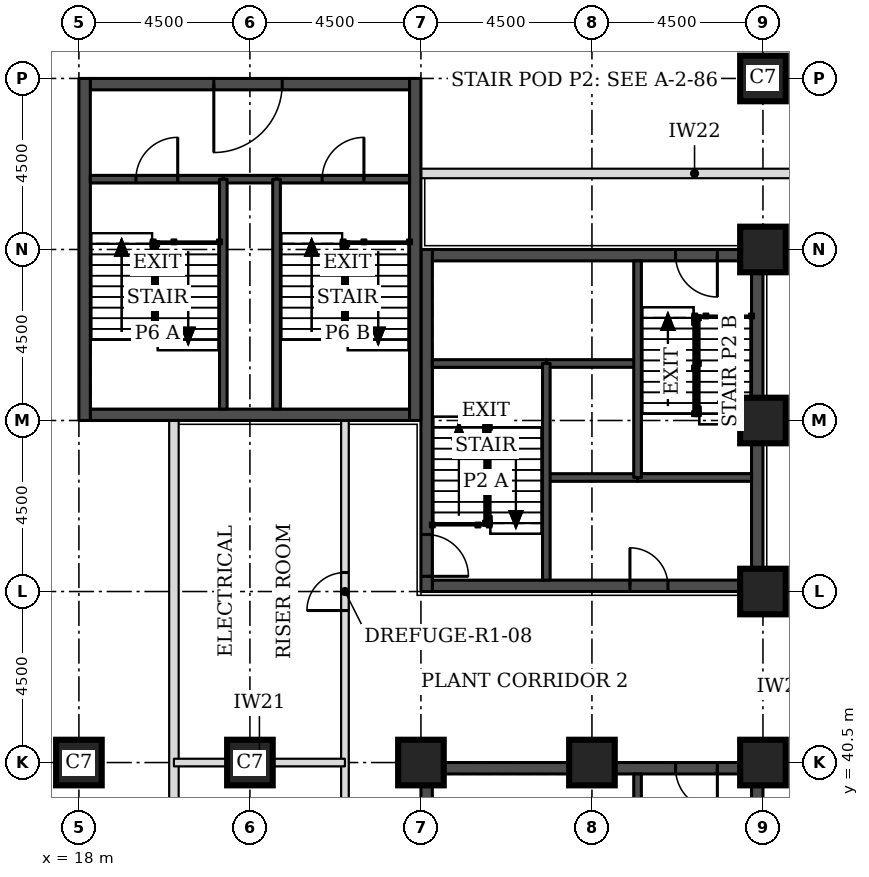
"""IFC4 building model, lengths in metres.
Left out: names, types, materials, properties, quantities, classifications, styles, units other than length and angle.
Written with IfcOpenShell. Run it as: python <this file> out.ifc"""

import sys

from ifc_helpers import new_model, si_unit, direction, frame, frame_2d, origin, origin_2d, place, context, subcontext, project, spatial, rectangle, extrude, element, fill, save


model = new_model("IFC4")
c1 = context("Model", 3, precision=1e-05, world=origin(), true_north=direction((0.0, 1.0)))
c2 = subcontext(c1, "Body", "Model", "MODEL_VIEW")
j1 = project(units=[si_unit("LENGTHUNIT", "METRE"), si_unit("PLANEANGLEUNIT", "RADIAN")], contexts=[c1])
p1 = place(None, origin())
s1 = spatial("IfcSite", under=j1, at=p1, CompositionType="ELEMENT")
p2 = place(p1, origin())
s2 = spatial("IfcBuilding", under=s1, at=p2, CompositionType="ELEMENT")
p3 = place(p2, frame((0.0, 0.0, 69.3)))
s3 = spatial("IfcBuildingStorey", under=s2, at=p3, CompositionType="ELEMENT", Elevation=69.3)
for number, where, z_axis, x_axis in (
    (1, (18.0, 40.5, 0.0), (0.0, 0.0, 1.0), (1.0, 0.0, 0.0)),
    (2, (22.5, 40.5, 0.0), (0.0, 0.0, 1.0), (1.0, 0.0, 0.0)),
    (3, (27.0, 40.5, 0.0), (0.0, 0.0, 1.0), (1.0, 0.0, 0.0)),
    (4, (31.5, 40.5, 0.0), (0.0, 0.0, 1.0), (1.0, 0.0, 0.0)),
    (5, (36.0, 40.5, 0.0), (0.0, 0.0, 1.0), (1.0, 0.0, 0.0)),
    (6, (36.0, 45.0, 0.0), (0.0, 0.0, 1.0), (1.0, 0.0, 0.0)),
    (7, (36.0, 49.5, 0.0), (0.0, 0.0, 1.0), (1.0, 0.0, 0.0)),
    (8, (36.0, 54.0, 0.0), (0.0, 0.0, 1.0), (1.0, 0.0, 0.0)),
    (9, (36.0, 58.5, 0.0), (0.0, 0.0, 1.0), (1.0, 0.0, 0.0)),
):
    element("IfcColumn", number, at=place(p3, frame(where, z_axis=z_axis, x_axis=x_axis)), inside=s3, PredefinedType="COLUMN", context=c2, shape_type="SweptSolid", body=[
        extrude(rectangle(XDim=1.2, YDim=1.2, at=origin_2d()), origin(), (0.0, 0.0, 1.0), 5.0),
    ])
p4 = place(p3, frame((27.3, 45.15, 0.0), z_axis=(0.0, 0.0, 1.0), x_axis=(1.0, 0.0, 0.0)))
e10 = element("IfcWall", 10, at=p4, inside=s3, PredefinedType="SHEAR", context=c2, shape_type="SweptSolid", body=[
    extrude(rectangle(XDim=8.4, YDim=0.3, at=frame_2d((4.2, 0.0))), origin(), (0.0, 0.0, 1.0), 5.0),
])
p5 = place(p4, frame((5.2, 0.0, 0.0)))
e11 = element("IfcOpeningElement", 11, at=p5, cuts=e10, PredefinedType="OPENING", context=c2, shape_type="SweptSolid", body=[
    extrude(rectangle(XDim=1.0, YDim=2.1, at=frame_2d((0.5, 1.05))), frame((0.0, 0.16, 0.0), z_axis=(0.0, -1.0, 0.0), x_axis=(1.0, 0.0, 0.0)), (0.0, 0.0, 1.0), 0.32),
])
p6 = place(p3, frame((27.3, 53.85, 0.0), z_axis=(0.0, 0.0, 1.0), x_axis=(1.0, 0.0, 0.0)))
e12 = element("IfcWall", 12, at=p6, inside=s3, PredefinedType="SHEAR", context=c2, shape_type="SweptSolid", body=[
    extrude(rectangle(XDim=8.4, YDim=0.3, at=frame_2d((4.2, 0.0))), origin(), (0.0, 0.0, 1.0), 5.0),
])
p7 = place(p6, frame((6.4, 0.0, 0.0)))
e13 = element("IfcOpeningElement", 13, at=p7, cuts=e12, PredefinedType="OPENING", context=c2, shape_type="SweptSolid", body=[
    extrude(rectangle(XDim=1.1, YDim=2.1, at=frame_2d((0.55, 1.05))), frame((0.0, 0.16, 0.0), z_axis=(0.0, -1.0, 0.0), x_axis=(1.0, 0.0, 0.0)), (0.0, 0.0, 1.0), 0.32),
])
p8 = place(p3, frame((27.15, 45.0, 0.0), z_axis=(0.0, 0.0, 1.0), x_axis=(0.0, 1.0, 0.0)))
e14 = element("IfcWall", 14, at=p8, inside=s3, PredefinedType="SHEAR", context=c2, shape_type="SweptSolid", body=[
    extrude(rectangle(XDim=9.0, YDim=0.3, at=frame_2d((4.5, 0.0))), origin(), (0.0, 0.0, 1.0), 5.0),
])
p9 = place(p8, frame((0.4, 0.0, 0.0)))
e15 = element("IfcOpeningElement", 15, at=p9, cuts=e14, PredefinedType="OPENING", context=c2, shape_type="SweptSolid", body=[
    extrude(rectangle(XDim=1.1, YDim=2.1, at=frame_2d((0.55, 1.05))), frame((0.0, 0.16, 0.0), z_axis=(0.0, -1.0, 0.0), x_axis=(1.0, 0.0, 0.0)), (0.0, 0.0, 1.0), 0.32),
])
p10 = place(p3, frame((35.85, 45.0, 0.0), z_axis=(0.0, 0.0, 1.0), x_axis=(0.0, 1.0, 0.0)))
e16 = element("IfcWall", 16, at=p10, inside=s3, PredefinedType="SHEAR", context=c2, shape_type="SweptSolid", body=[
    extrude(rectangle(XDim=9.0, YDim=0.3, at=frame_2d((4.5, 0.0))), origin(), (0.0, 0.0, 1.0), 5.0),
])
p11 = place(p3, frame((27.3, 40.35, 0.0), z_axis=(0.0, 0.0, 1.0), x_axis=(1.0, 0.0, 0.0)))
e17 = element("IfcWall", 17, at=p11, inside=s3, PredefinedType="SHEAR", context=c2, shape_type="SweptSolid", body=[
    extrude(rectangle(XDim=8.4, YDim=0.3, at=frame_2d((4.2, 0.0))), origin(), (0.0, 0.0, 1.0), 5.0),
])
p12 = place(p11, frame((6.4, 0.0, 0.0)))
e18 = element("IfcOpeningElement", 18, at=p12, cuts=e17, PredefinedType="OPENING", context=c2, shape_type="SweptSolid", body=[
    extrude(rectangle(XDim=1.1, YDim=2.1, at=frame_2d((0.55, 1.05))), frame((0.0, 0.16, 0.0), z_axis=(0.0, -1.0, 0.0), x_axis=(1.0, 0.0, 0.0)), (0.0, 0.0, 1.0), 0.32),
])
p13 = place(p3, frame((27.15, 31.5, 0.0), z_axis=(0.0, 0.0, 1.0), x_axis=(0.0, 1.0, 0.0)))
e19 = element("IfcWall", 19, at=p13, inside=s3, PredefinedType="SHEAR", context=c2, shape_type="SweptSolid", body=[
    extrude(rectangle(XDim=9.0, YDim=0.3, at=frame_2d((4.5, 0.0))), origin(), (0.0, 0.0, 1.0), 5.0),
])
p14 = place(p13, frame((0.4, 0.0, 0.0)))
e20 = element("IfcOpeningElement", 20, at=p14, cuts=e19, PredefinedType="OPENING", context=c2, shape_type="SweptSolid", body=[
    extrude(rectangle(XDim=1.1, YDim=2.1, at=frame_2d((0.55, 1.05))), frame((0.0, 0.16, 0.0), z_axis=(0.0, -1.0, 0.0), x_axis=(1.0, 0.0, 0.0)), (0.0, 0.0, 1.0), 0.32),
])
p15 = place(p3, frame((35.85, 31.5, 0.0), z_axis=(0.0, 0.0, 1.0), x_axis=(0.0, 1.0, 0.0)))
e21 = element("IfcWall", 21, at=p15, inside=s3, PredefinedType="SHEAR", context=c2, shape_type="SweptSolid", body=[
    extrude(rectangle(XDim=9.0, YDim=0.3, at=frame_2d((4.5, 0.0))), origin(), (0.0, 0.0, 1.0), 5.0),
])
p16 = place(p3, frame((18.3, 49.65, 0.0), z_axis=(0.0, 0.0, 1.0), x_axis=(1.0, 0.0, 0.0)))
e22 = element("IfcWall", 22, at=p16, inside=s3, PredefinedType="SHEAR", context=c2, shape_type="SweptSolid", body=[
    extrude(rectangle(XDim=8.4, YDim=0.3, at=frame_2d((4.2, 0.0))), origin(), (0.0, 0.0, 1.0), 5.0),
])
p17 = place(p3, frame((18.3, 58.35, 0.0), z_axis=(0.0, 0.0, 1.0), x_axis=(1.0, 0.0, 0.0)))
e23 = element("IfcWall", 23, at=p17, inside=s3, PredefinedType="SHEAR", context=c2, shape_type="SweptSolid", body=[
    extrude(rectangle(XDim=8.4, YDim=0.3, at=frame_2d((4.2, 0.0))), origin(), (0.0, 0.0, 1.0), 5.0),
])
p18 = place(p17, frame((3.25, 0.0, 0.0)))
e24 = element("IfcOpeningElement", 24, at=p18, cuts=e23, PredefinedType="OPENING", context=c2, shape_type="SweptSolid", body=[
    extrude(rectangle(XDim=1.8, YDim=2.1, at=frame_2d((0.9, 1.05))), frame((0.0, 0.16, 0.0), z_axis=(0.0, -1.0, 0.0), x_axis=(1.0, 0.0, 0.0)), (0.0, 0.0, 1.0), 0.32),
])
for number, where, z_axis, x_axis in (
    (25, (18.15, 49.5, 0.0), (0.0, 0.0, 1.0), (0.0, 1.0, 0.0)),
    (26, (26.85, 49.5, 0.0), (0.0, 0.0, 1.0), (0.0, 1.0, 0.0)),
):
    element("IfcWall", number, at=place(p3, frame(where, z_axis=z_axis, x_axis=x_axis)), inside=s3, PredefinedType="SHEAR", context=c2, shape_type="SweptSolid", body=[
        extrude(rectangle(XDim=9.0, YDim=0.3, at=frame_2d((4.5, 0.0))), origin(), (0.0, 0.0, 1.0), 5.0),
    ])
p19 = place(p3, frame((20.5, 25.399, 0.0), z_axis=(0.0, 0.0, 1.0), x_axis=(0.0, 1.0, 0.0)))
e27 = element("IfcWall", 27, at=p19, inside=s3, PredefinedType="PARTITIONING", context=c2, shape_type="SweptSolid", body=[
    extrude(rectangle(XDim=24.101, YDim=0.25, at=frame_2d((12.051, 0.0))), origin(), (0.0, 0.0, 1.0), 4.85),
])
p20 = place(p3, frame((27.0, 56.0, 0.0), z_axis=(0.0, 0.0, 1.0), x_axis=(1.0, 0.0, 0.0)))
e28 = element("IfcWall", 28, at=p20, inside=s3, PredefinedType="PARTITIONING", context=c2, shape_type="SweptSolid", body=[
    extrude(rectangle(XDim=16.0, YDim=0.25, at=frame_2d((8.0, 0.0))), origin(), (0.0, 0.0, 1.0), 4.85),
])
p21 = place(p3, frame((25.0, 29.5, 0.0), z_axis=(0.0, 0.0, 1.0), x_axis=(0.0, 1.0, 0.0)))
e29 = element("IfcWall", 29, at=p21, inside=s3, PredefinedType="PARTITIONING", context=c2, shape_type="SweptSolid", body=[
    extrude(rectangle(XDim=20.0, YDim=0.2, at=frame_2d((10.0, 0.0))), origin(), (0.0, 0.0, 1.0), 4.85),
])
p22 = place(p21, frame((0.5, 0.0, 0.0)))
e30 = element("IfcOpeningElement", 30, at=p22, cuts=e29, PredefinedType="OPENING", context=c2, shape_type="SweptSolid", body=[
    extrude(rectangle(XDim=1.0, YDim=2.1, at=frame_2d((0.5, 1.05))), frame((0.0, 0.11, 0.0), z_axis=(0.0, -1.0, 0.0), x_axis=(1.0, 0.0, 0.0)), (0.0, 0.0, 1.0), 0.22),
])
p23 = place(p21, frame((6.0, 0.0, 0.0)))
e31 = element("IfcOpeningElement", 31, at=p23, cuts=e29, PredefinedType="OPENING", context=c2, shape_type="SweptSolid", body=[
    extrude(rectangle(XDim=1.0, YDim=2.1, at=frame_2d((0.5, 1.05))), frame((0.0, 0.11, 0.0), z_axis=(0.0, -1.0, 0.0), x_axis=(1.0, 0.0, 0.0)), (0.0, 0.0, 1.0), 0.22),
])
p24 = place(p21, frame((15.0, 0.0, 0.0)))
e32 = element("IfcOpeningElement", 32, at=p24, cuts=e29, PredefinedType="OPENING", context=c2, shape_type="SweptSolid", body=[
    extrude(rectangle(XDim=1.0, YDim=2.1, at=frame_2d((0.5, 1.05))), frame((0.0, 0.11, 0.0), z_axis=(0.0, -1.0, 0.0), x_axis=(1.0, 0.0, 0.0)), (0.0, 0.0, 1.0), 0.22),
])
p25 = place(p3, frame((20.5, 40.5, 0.0), z_axis=(0.0, 0.0, 1.0), x_axis=(1.0, 0.0, 0.0)))
e33 = element("IfcWall", 33, at=p25, inside=s3, PredefinedType="PARTITIONING", context=c2, shape_type="SweptSolid", body=[
    extrude(rectangle(XDim=4.5, YDim=0.2, at=frame_2d((2.25, 0.0))), origin(), (0.0, 0.0, 1.0), 4.85),
])
p26 = place(p3, frame((30.3, 48.0, 0.0), z_axis=(0.0, 0.0, 1.0), x_axis=(1.0, 0.0, 0.0)))
e34 = element("IfcWall", 34, at=p26, inside=s3, PredefinedType="SOLIDWALL", context=c2, shape_type="SweptSolid", body=[
    extrude(rectangle(XDim=2.4, YDim=0.2, at=frame_2d((1.2, 0.0))), origin(), (0.0, 0.0, 1.0), 4.85),
])
p27 = place(p3, frame((32.7, 48.0, 0.0), z_axis=(0.0, 0.0, 1.0), x_axis=(1.0, 0.0, 0.0)))
e35 = element("IfcWall", 35, at=p27, inside=s3, PredefinedType="SOLIDWALL", context=c2, shape_type="SweptSolid", body=[
    extrude(rectangle(XDim=3.0, YDim=0.2, at=frame_2d((1.5, 0.0))), origin(), (0.0, 0.0, 1.0), 4.85),
])
p28 = place(p3, frame((30.3, 51.0, 0.0), z_axis=(0.0, 0.0, 1.0), x_axis=(1.0, 0.0, 0.0)))
e36 = element("IfcWall", 36, at=p28, inside=s3, PredefinedType="SOLIDWALL", context=c2, shape_type="SweptSolid", body=[
    extrude(rectangle(XDim=2.4, YDim=0.2, at=frame_2d((1.2, 0.0))), origin(), (0.0, 0.0, 1.0), 5.0),
])
p29 = place(p3, frame((27.3, 51.0, 0.0), z_axis=(0.0, 0.0, 1.0), x_axis=(1.0, 0.0, 0.0)))
e37 = element("IfcWall", 37, at=p29, inside=s3, PredefinedType="SOLIDWALL", context=c2, shape_type="SweptSolid", body=[
    extrude(rectangle(XDim=3.0, YDim=0.2, at=frame_2d((1.5, 0.0))), origin(), (0.0, 0.0, 1.0), 4.85),
])
for number, where, z_axis, x_axis in (
    (38, (30.3, 45.3, 0.0), (0.0, 0.0, 1.0), (0.0, 1.0, 0.0)),
    (39, (32.7, 48.0, 0.0), (0.0, 0.0, 1.0), (0.0, 1.0, 0.0)),
    (40, (32.7, 34.5, 0.0), (0.0, 0.0, 1.0), (0.0, 1.0, 0.0)),
):
    element("IfcWall", number, at=place(p3, frame(where, z_axis=z_axis, x_axis=x_axis)), inside=s3, PredefinedType="SOLIDWALL", context=c2, shape_type="SweptSolid", body=[
        extrude(rectangle(XDim=5.7, YDim=0.2, at=frame_2d((2.85, 0.0))), origin(), (0.0, 0.0, 1.0), 4.85),
    ])
p30 = place(p3, frame((21.8, 55.85, 0.0), z_axis=(0.0, 0.0, 1.0), x_axis=(1.0, 0.0, 0.0)))
e41 = element("IfcWall", 41, at=p30, inside=s3, PredefinedType="SOLIDWALL", context=c2, shape_type="SweptSolid", body=[
    extrude(rectangle(XDim=1.4, YDim=0.2, at=frame_2d((0.7, 0.0))), origin(), (0.0, 0.0, 1.0), 4.85),
])
p31 = place(p3, frame((18.3, 55.85, 0.0), z_axis=(0.0, 0.0, 1.0), x_axis=(1.0, 0.0, 0.0)))
e42 = element("IfcWall", 42, at=p31, inside=s3, PredefinedType="SOLIDWALL", context=c2, shape_type="SweptSolid", body=[
    extrude(rectangle(XDim=3.5, YDim=0.2, at=frame_2d((1.75, 0.0))), origin(), (0.0, 0.0, 1.0), 4.85),
])
p32 = place(p31, frame((1.2, 0.0, 0.0)))
e43 = element("IfcOpeningElement", 43, at=p32, cuts=e42, PredefinedType="OPENING", context=c2, shape_type="SweptSolid", body=[
    extrude(rectangle(XDim=1.1, YDim=2.1, at=frame_2d((0.55, 1.05))), frame((0.0, 0.11, 0.0), z_axis=(0.0, -1.0, 0.0), x_axis=(1.0, 0.0, 0.0)), (0.0, 0.0, 1.0), 0.22),
])
p33 = place(p3, frame((23.2, 55.85, 0.0), z_axis=(0.0, 0.0, 1.0), x_axis=(1.0, 0.0, 0.0)))
e44 = element("IfcWall", 44, at=p33, inside=s3, PredefinedType="SOLIDWALL", context=c2, shape_type="SweptSolid", body=[
    extrude(rectangle(XDim=3.5, YDim=0.2, at=frame_2d((1.75, 0.0))), origin(), (0.0, 0.0, 1.0), 4.85),
])
p34 = place(p33, frame((1.2, 0.0, 0.0)))
e45 = element("IfcOpeningElement", 45, at=p34, cuts=e44, PredefinedType="OPENING", context=c2, shape_type="SweptSolid", body=[
    extrude(rectangle(XDim=1.1, YDim=2.1, at=frame_2d((0.55, 1.05))), frame((0.0, 0.11, 0.0), z_axis=(0.0, -1.0, 0.0), x_axis=(1.0, 0.0, 0.0)), (0.0, 0.0, 1.0), 0.22),
])
for number, where, z_axis, x_axis in (
    (46, (21.8, 49.8, 0.0), (0.0, 0.0, 1.0), (0.0, 1.0, 0.0)),
    (47, (23.2, 49.8, 0.0), (0.0, 0.0, 1.0), (0.0, 1.0, 0.0)),
):
    element("IfcWall", number, at=place(p3, frame(where, z_axis=z_axis, x_axis=x_axis)), inside=s3, PredefinedType="SOLIDWALL", context=c2, shape_type="SweptSolid", body=[
        extrude(rectangle(XDim=6.05, YDim=0.2, at=frame_2d((3.025, 0.0))), origin(), (0.0, 0.0, 1.0), 4.85),
    ])
p35 = place(p24, origin())
e48 = element("IfcDoor", 48, at=p35, inside=s3, OperationType="SINGLE_SWING_LEFT", PredefinedType="DOOR", context=c2, shape_type="SweptSolid", body=[
    extrude(rectangle(XDim=1.0, YDim=2.1, at=frame_2d((0.5, 1.05))), frame((0.0, 0.025, 0.0), z_axis=(0.0, -1.0, 0.0), x_axis=(1.0, 0.0, 0.0)), (0.0, 0.0, 1.0), 0.05),
])
fill(e32, e48)
p36 = place(p9, frame((1.1, 0.0, 0.0), z_axis=(0.0, 0.0, 1.0), x_axis=(-1.0, 0.0, 0.0)))
e49 = element("IfcDoor", 49, at=p36, inside=s3, OperationType="SINGLE_SWING_RIGHT", PredefinedType="DOOR", context=c2, shape_type="SweptSolid", body=[
    extrude(rectangle(XDim=1.1, YDim=2.1, at=frame_2d((0.55, 1.05))), frame((0.0, 0.025, 0.0), z_axis=(0.0, -1.0, 0.0), x_axis=(1.0, 0.0, 0.0)), (0.0, 0.0, 1.0), 0.05),
])
fill(e15, e49)
p37 = place(p7, frame((1.1, 0.0, 0.0), z_axis=(0.0, 0.0, 1.0), x_axis=(-1.0, 0.0, 0.0)))
e50 = element("IfcDoor", 50, at=p37, inside=s3, OperationType="SINGLE_SWING_LEFT", PredefinedType="DOOR", context=c2, shape_type="SweptSolid", body=[
    extrude(rectangle(XDim=1.1, YDim=2.1, at=frame_2d((0.55, 1.05))), frame((0.0, 0.025, 0.0), z_axis=(0.0, -1.0, 0.0), x_axis=(1.0, 0.0, 0.0)), (0.0, 0.0, 1.0), 0.05),
])
fill(e13, e50)
p38 = place(p5, origin())
e51 = element("IfcDoor", 51, at=p38, inside=s3, OperationType="SINGLE_SWING_LEFT", PredefinedType="DOOR", context=c2, shape_type="SweptSolid", body=[
    extrude(rectangle(XDim=1.0, YDim=2.1, at=frame_2d((0.5, 1.05))), frame((0.0, 0.025, 0.0), z_axis=(0.0, -1.0, 0.0), x_axis=(1.0, 0.0, 0.0)), (0.0, 0.0, 1.0), 0.05),
])
fill(e11, e51)
p39 = place(p12, frame((1.1, 0.0, 0.0), z_axis=(0.0, 0.0, 1.0), x_axis=(-1.0, 0.0, 0.0)))
e52 = element("IfcDoor", 52, at=p39, inside=s3, OperationType="SINGLE_SWING_LEFT", PredefinedType="DOOR", context=c2, shape_type="SweptSolid", body=[
    extrude(rectangle(XDim=1.1, YDim=2.1, at=frame_2d((0.55, 1.05))), frame((0.0, 0.025, 0.0), z_axis=(0.0, -1.0, 0.0), x_axis=(1.0, 0.0, 0.0)), (0.0, 0.0, 1.0), 0.05),
])
fill(e18, e52)
p40 = place(p32, origin())
e53 = element("IfcDoor", 53, at=p40, inside=s3, OperationType="SINGLE_SWING_RIGHT", PredefinedType="DOOR", context=c2, shape_type="SweptSolid", body=[
    extrude(rectangle(XDim=1.1, YDim=2.1, at=frame_2d((0.55, 1.05))), frame((0.0, 0.025, 0.0), z_axis=(0.0, -1.0, 0.0), x_axis=(1.0, 0.0, 0.0)), (0.0, 0.0, 1.0), 0.05),
])
fill(e43, e53)
p41 = place(p34, origin())
e54 = element("IfcDoor", 54, at=p41, inside=s3, OperationType="SINGLE_SWING_RIGHT", PredefinedType="DOOR", context=c2, shape_type="SweptSolid", body=[
    extrude(rectangle(XDim=1.1, YDim=2.1, at=frame_2d((0.55, 1.05))), frame((0.0, 0.025, 0.0), z_axis=(0.0, -1.0, 0.0), x_axis=(1.0, 0.0, 0.0)), (0.0, 0.0, 1.0), 0.05),
])
fill(e45, e54)
p42 = place(p18, frame((1.8, 0.0, 0.0), z_axis=(0.0, 0.0, 1.0), x_axis=(-1.0, 0.0, 0.0)))
e55 = element("IfcDoor", 55, at=p42, inside=s3, OperationType="SINGLE_SWING_RIGHT", PredefinedType="DOOR", context=c2, shape_type="SweptSolid", body=[
    extrude(rectangle(XDim=1.8, YDim=2.1, at=frame_2d((0.9, 1.05))), frame((0.0, 0.025, 0.0), z_axis=(0.0, -1.0, 0.0), x_axis=(1.0, 0.0, 0.0)), (0.0, 0.0, 1.0), 0.05),
])
fill(e24, e55)
save(model, sys.argv[1])
